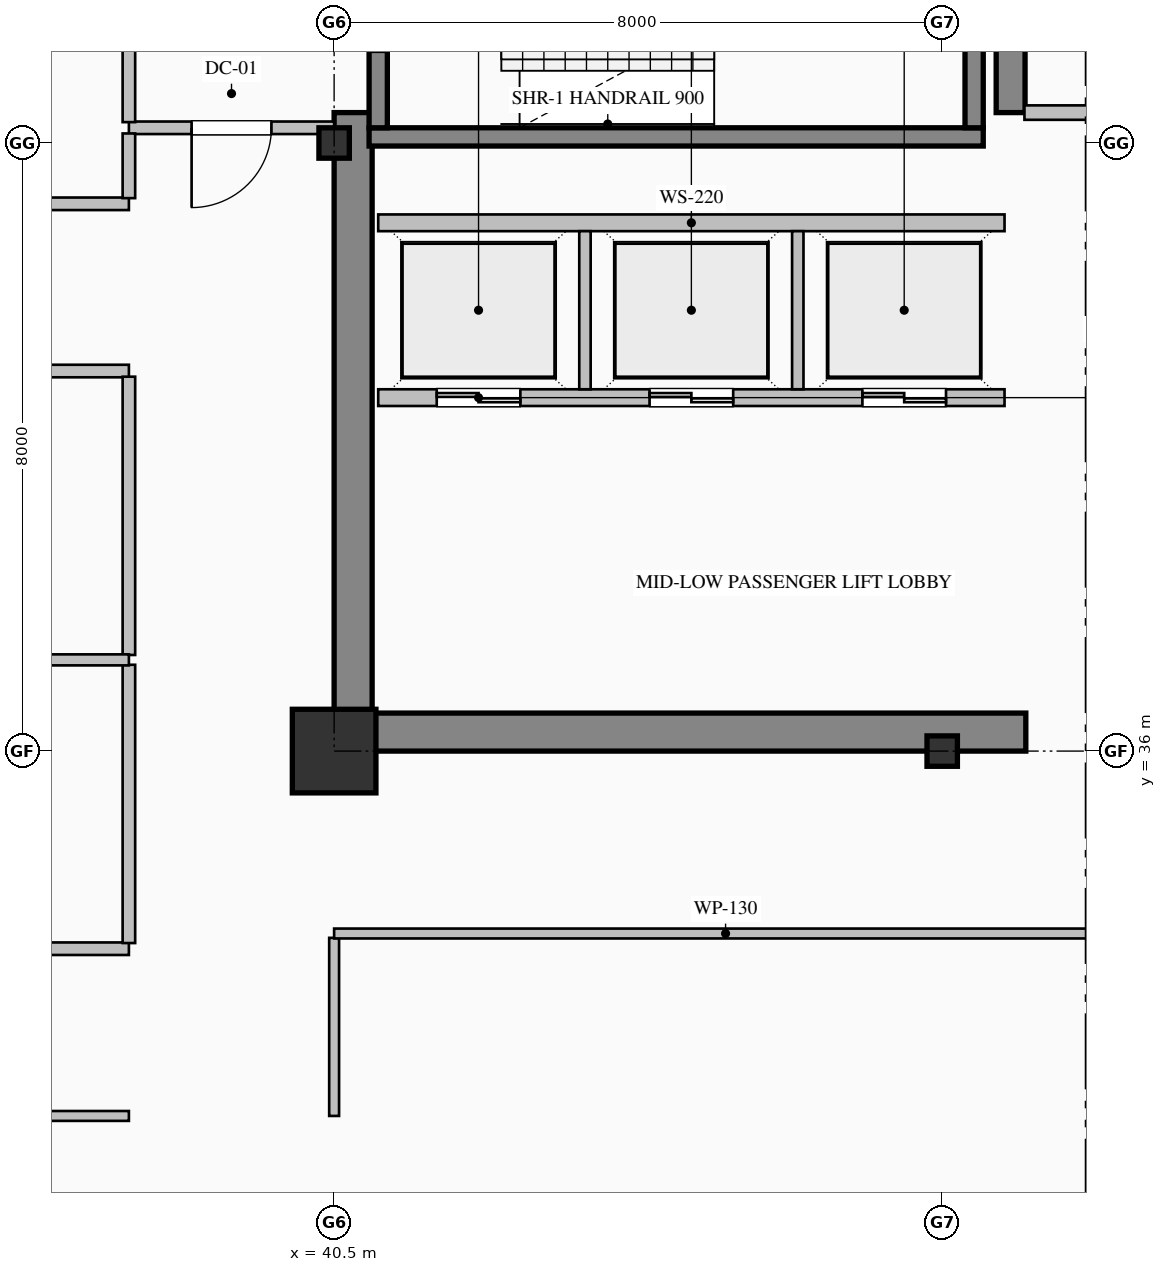
"""IFC4 building model, lengths in metres.
Left out: names, types, materials, properties, quantities, classifications, styles, units other than length and angle.
Written with IfcOpenShell. Run it as: python <this file> out.ifc"""

import sys

from ifc_helpers import new_model, si_unit, direction, frame, frame_2d, origin, origin_2d, place, context, subcontext, project, spatial, rectangle, hollow_rectangle, i_section, extrude, element, fill, save


model = new_model("IFC4")
c1 = context("Model", 3, precision=1e-05, world=origin(), true_north=direction((0.0, 1.0)))
c2 = subcontext(c1, "Body", "Model", "MODEL_VIEW")
j1 = project(units=[si_unit("LENGTHUNIT", "METRE"), si_unit("PLANEANGLEUNIT", "RADIAN")], contexts=[c1])
p1 = place(None, origin())
s1 = spatial("IfcSite", under=j1, at=p1, CompositionType="ELEMENT")
p2 = place(p1, origin())
s2 = spatial("IfcBuilding", under=s1, at=p2, CompositionType="ELEMENT")
p3 = place(p2, frame((0.0, 0.0, 191.0)))
s3 = spatial("IfcBuildingStorey", under=s2, at=p3, CompositionType="ELEMENT", Elevation=191.0)
p4 = place(p3, frame((40.75, 36.5, 0.0), z_axis=(0.0, 0.0, 1.0), x_axis=(0.0, 1.0, 0.0)))
e1 = element("IfcWall", 1, at=p4, inside=s3, PredefinedType="SHEAR", context=c2, shape_type="SweptSolid", body=[
    extrude(rectangle(XDim=7.9, YDim=0.5, at=frame_2d((3.95, 0.0))), origin(), (0.0, 0.0, 1.0), 3.65),
])
p5 = place(p3, frame((40.5, 36.25, 0.0), z_axis=(0.0, 0.0, 1.0), x_axis=(1.0, 0.0, 0.0)))
e2 = element("IfcWall", 2, at=p5, inside=s3, PredefinedType="SHEAR", context=c2, shape_type="SweptSolid", body=[
    extrude(rectangle(XDim=9.1, YDim=0.5, at=frame_2d((4.55, 0.0))), origin(), (0.0, 0.0, 1.0), 3.65),
])
p6 = place(p3, frame((49.4, 44.4, 0.0), z_axis=(0.0, 0.0, 1.0), x_axis=(0.0, 1.0, 0.0)))
e3 = element("IfcWall", 3, at=p6, inside=s3, PredefinedType="SHEAR", context=c2, shape_type="SweptSolid", body=[
    extrude(rectangle(XDim=3.0, YDim=0.38, at=frame_2d((1.5, 0.0))), origin(), (0.0, 0.0, 1.0), 3.65),
])
p7 = place(p3, frame((40.5, 36.0, 0.0), z_axis=(0.0, 0.0, 1.0), x_axis=(1.0, 0.0, 0.0)))
e4 = element("IfcColumn", 4, at=p7, inside=s3, PredefinedType="COLUMN", context=c2, shape_type="SweptSolid", body=[
    extrude(hollow_rectangle(XDim=1.1, YDim=1.1, WallThickness=0.04, at=origin_2d()), origin(), (0.0, 0.0, 1.0), 4.0),
])
for number, where, z_axis, x_axis in (
    (5, (40.5, 44.0, 0.0), (0.0, 0.0, 1.0), (1.0, 0.0, 0.0)),
    (6, (48.5, 36.0, 0.0), (0.0, 0.0, 1.0), (1.0, 0.0, 0.0)),
):
    element("IfcColumn", number, at=place(p3, frame(where, z_axis=z_axis, x_axis=x_axis)), inside=s3, PredefinedType="COLUMN", context=c2, shape_type="SweptSolid", body=[
        extrude(i_section(OverallWidth=0.4, OverallDepth=0.4, WebThickness=0.013, FlangeThickness=0.021, FilletRadius=0.022, at=origin_2d()), origin(), (0.0, 0.0, 1.0), 4.0),
    ])
p8 = place(p3, frame((49.04, 44.08, 0.0), z_axis=(0.0, 0.0, 1.0), x_axis=(-1.0, 0.0, 0.0)))
e7 = element("IfcWall", 7, at=p8, inside=s3, PredefinedType="SOLIDWALL", context=c2, shape_type="SweptSolid", body=[
    extrude(rectangle(XDim=8.08, YDim=0.24, at=frame_2d((4.04, 0.0))), origin(), (0.0, 0.0, 1.0), 4.0),
])
p9 = place(p3, frame((41.08, 47.35, 0.0), z_axis=(0.0, 0.0, 1.0), x_axis=(0.0, -1.0, 0.0)))
e8 = element("IfcWall", 8, at=p9, inside=s3, PredefinedType="SOLIDWALL", context=c2, shape_type="SweptSolid", body=[
    extrude(rectangle(XDim=3.15, YDim=0.24, at=frame_2d((1.575, 0.0))), origin(), (0.0, 0.0, 1.0), 4.0),
])
p10 = place(p9, frame((1.0, 0.0, 0.0)))
e9 = element("IfcOpeningElement", 9, at=p10, cuts=e8, PredefinedType="OPENING", context=c2, shape_type="SweptSolid", body=[
    extrude(rectangle(XDim=1.15, YDim=2.2, at=frame_2d((0.575, 1.1))), frame((0.0, 0.13, 0.0), z_axis=(0.0, -1.0, 0.0), x_axis=(1.0, 0.0, 0.0)), (0.0, 0.0, 1.0), 0.26),
])
p11 = place(p3, frame((48.92, 44.2, 0.0), z_axis=(0.0, 0.0, 1.0), x_axis=(0.0, 1.0, 0.0)))
e10 = element("IfcWall", 10, at=p11, inside=s3, PredefinedType="SOLIDWALL", context=c2, shape_type="SweptSolid", body=[
    extrude(rectangle(XDim=3.15, YDim=0.24, at=frame_2d((1.575, 0.0))), origin(), (0.0, 0.0, 1.0), 4.0),
])
p12 = place(p3, frame((49.32, 40.65, 0.0), z_axis=(0.0, 0.0, 1.0), x_axis=(-1.0, 0.0, 0.0)))
e11 = element("IfcWall", 11, at=p12, inside=s3, PredefinedType="PARTITIONING", context=c2, shape_type="SweptSolid", body=[
    extrude(rectangle(XDim=8.24, YDim=0.22, at=frame_2d((4.12, 0.0))), origin(), (0.0, 0.0, 1.0), 3.65),
])
p13 = place(p12, frame((6.37, 0.0, 0.0)))
e12 = element("IfcOpeningElement", 12, at=p13, cuts=e11, PredefinedType="OPENING", context=c2, shape_type="SweptSolid", body=[
    extrude(rectangle(XDim=1.1, YDim=2.2, at=frame_2d((0.55, 1.1))), frame((0.0, 0.12, 0.0), z_axis=(0.0, -1.0, 0.0), x_axis=(1.0, 0.0, 0.0)), (0.0, 0.0, 1.0), 0.24),
])
p14 = place(p12, frame((3.57, 0.0, 0.0)))
e13 = element("IfcOpeningElement", 13, at=p14, cuts=e11, PredefinedType="OPENING", context=c2, shape_type="SweptSolid", body=[
    extrude(rectangle(XDim=1.1, YDim=2.2, at=frame_2d((0.55, 1.1))), frame((0.0, 0.12, 0.0), z_axis=(0.0, -1.0, 0.0), x_axis=(1.0, 0.0, 0.0)), (0.0, 0.0, 1.0), 0.24),
])
p15 = place(p12, frame((0.77, 0.0, 0.0)))
e14 = element("IfcOpeningElement", 14, at=p15, cuts=e11, PredefinedType="OPENING", context=c2, shape_type="SweptSolid", body=[
    extrude(rectangle(XDim=1.1, YDim=2.2, at=frame_2d((0.55, 1.1))), frame((0.0, 0.12, 0.0), z_axis=(0.0, -1.0, 0.0), x_axis=(1.0, 0.0, 0.0)), (0.0, 0.0, 1.0), 0.24),
])
p16 = place(p3, frame((41.08, 42.95, 0.0), z_axis=(0.0, 0.0, 1.0), x_axis=(1.0, 0.0, 0.0)))
e15 = element("IfcWall", 15, at=p16, inside=s3, PredefinedType="PARTITIONING", context=c2, shape_type="SweptSolid", body=[
    extrude(rectangle(XDim=8.24, YDim=0.22, at=frame_2d((4.12, 0.0))), origin(), (0.0, 0.0, 1.0), 3.65),
])
for number, where, z_axis, x_axis in (
    (16, (43.8, 40.76, 0.0), (0.0, 0.0, 1.0), (0.0, 1.0, 0.0)),
    (17, (46.6, 40.76, 0.0), (0.0, 0.0, 1.0), (0.0, 1.0, 0.0)),
):
    element("IfcWall", number, at=place(p3, frame(where, z_axis=z_axis, x_axis=x_axis)), inside=s3, PredefinedType="PARTITIONING", context=c2, shape_type="SweptSolid", body=[
        extrude(rectangle(XDim=2.08, YDim=0.15, at=frame_2d((1.04, 0.0))), origin(), (0.0, 0.0, 1.0), 3.65),
    ])
p17 = place(p3, frame((40.5, 44.2, 0.0), z_axis=(0.0, 0.0, 1.0), x_axis=(-1.0, 0.0, 0.0)))
e18 = element("IfcWall", 18, at=p17, inside=s3, PredefinedType="PARTITIONING", context=c2, shape_type="SweptSolid", body=[
    extrude(rectangle(XDim=2.7, YDim=0.165, at=frame_2d((1.35, 0.0))), origin(), (0.0, 0.0, 1.0), 3.65),
])
p18 = place(p17, frame((0.825, 0.0, 0.0)))
e19 = element("IfcOpeningElement", 19, at=p18, cuts=e18, PredefinedType="OPENING", context=c2, shape_type="SweptSolid", body=[
    extrude(rectangle(XDim=1.05, YDim=2.15, at=frame_2d((0.525, 1.075))), frame((0.0, 0.093, 0.0), z_axis=(0.0, -1.0, 0.0), x_axis=(1.0, 0.0, 0.0)), (0.0, 0.0, 1.0), 0.185),
])
p19 = place(p3, frame((37.8, 44.274, 0.0), z_axis=(0.0, 0.0, 1.0), x_axis=(0.0, 1.0, 0.0)))
e20 = element("IfcWall", 20, at=p19, inside=s3, PredefinedType="PARTITIONING", context=c2, shape_type="SweptSolid", body=[
    extrude(rectangle(XDim=3.051, YDim=0.165, at=frame_2d((1.525, 0.0))), origin(), (0.0, 0.0, 1.0), 3.65),
])
p20 = place(p3, frame((54.718, 44.4, 0.0), z_axis=(0.0, 0.0, 1.0), x_axis=(-1.0, 0.0, 0.0)))
e21 = element("IfcWall", 21, at=p20, inside=s3, PredefinedType="PARTITIONING", context=c2, shape_type="SweptSolid", body=[
    extrude(rectangle(XDim=5.136, YDim=0.19, at=frame_2d((2.568, 0.0))), origin(), (0.0, 0.0, 1.0), 3.65),
])
p21 = place(p20, frame((2.043, 0.0, 0.0)))
e22 = element("IfcOpeningElement", 22, at=p21, cuts=e21, PredefinedType="OPENING", context=c2, shape_type="SweptSolid", body=[
    extrude(rectangle(XDim=1.05, YDim=2.15, at=frame_2d((0.525, 1.075))), frame((0.0, 0.105, 0.0), z_axis=(0.0, -1.0, 0.0), x_axis=(1.0, 0.0, 0.0)), (0.0, 0.0, 1.0), 0.21),
])
p22 = place(p3, frame((18.7, 33.4, 0.0), z_axis=(0.0, 0.0, 1.0), x_axis=(1.0, 0.0, 0.0)))
e23 = element("IfcWall", 23, at=p22, inside=s3, PredefinedType="PARTITIONING", context=c2, shape_type="SweptSolid", body=[
    extrude(rectangle(XDim=19.1, YDim=0.165, at=frame_2d((9.55, 0.0))), origin(), (0.0, 0.0, 1.0), 3.65),
])
p23 = place(p22, frame((9.1, 0.0, 0.0)))
e24 = element("IfcOpeningElement", 24, at=p23, cuts=e23, PredefinedType="OPENING", context=c2, shape_type="SweptSolid", body=[
    extrude(rectangle(XDim=0.9, YDim=2.15, at=frame_2d((0.45, 1.075))), frame((0.0, 0.093, 0.0), z_axis=(0.0, -1.0, 0.0), x_axis=(1.0, 0.0, 0.0)), (0.0, 0.0, 1.0), 0.185),
])
p24 = place(p3, frame((37.8, 31.2, 0.0), z_axis=(0.0, 0.0, 1.0), x_axis=(-1.0, 0.0, 0.0)))
e25 = element("IfcWall", 25, at=p24, inside=s3, PredefinedType="PARTITIONING", context=c2, shape_type="SweptSolid", body=[
    extrude(rectangle(XDim=10.8, YDim=0.13, at=frame_2d((5.4, 0.0))), origin(), (0.0, 0.0, 1.0), 3.65),
])
p25 = place(p24, frame((4.9, 0.0, 0.0)))
e26 = element("IfcOpeningElement", 26, at=p25, cuts=e25, PredefinedType="OPENING", context=c2, shape_type="SweptSolid", body=[
    extrude(rectangle(XDim=1.0, YDim=2.15, at=frame_2d((0.5, 1.075))), frame((0.0, 0.075, 0.0), z_axis=(0.0, -1.0, 0.0), x_axis=(1.0, 0.0, 0.0)), (0.0, 0.0, 1.0), 0.15),
])
p26 = place(p3, frame((30.6, 43.2, 0.0), z_axis=(0.0, 0.0, 1.0), x_axis=(1.0, 0.0, 0.0)))
e27 = element("IfcWall", 27, at=p26, inside=s3, PredefinedType="PARTITIONING", context=c2, shape_type="SweptSolid", body=[
    extrude(rectangle(XDim=7.2, YDim=0.165, at=frame_2d((3.6, 0.0))), origin(), (0.0, 0.0, 1.0), 3.65),
])
p27 = place(p26, frame((3.05, 0.0, 0.0)))
e28 = element("IfcOpeningElement", 28, at=p27, cuts=e27, PredefinedType="OPENING", context=c2, shape_type="SweptSolid", body=[
    extrude(rectangle(XDim=1.1, YDim=2.2, at=frame_2d((0.55, 1.1))), frame((0.0, 0.093, 0.0), z_axis=(0.0, -1.0, 0.0), x_axis=(1.0, 0.0, 0.0)), (0.0, 0.0, 1.0), 0.185),
])
p28 = place(p3, frame((37.8, 41.0, 0.0), z_axis=(0.0, 0.0, 1.0), x_axis=(-1.0, 0.0, 0.0)))
e29 = element("IfcWall", 29, at=p28, inside=s3, PredefinedType="PARTITIONING", context=c2, shape_type="SweptSolid", body=[
    extrude(rectangle(XDim=19.1, YDim=0.165, at=frame_2d((9.55, 0.0))), origin(), (0.0, 0.0, 1.0), 3.65),
])
p29 = place(p28, frame((9.05, 0.0, 0.0)))
e30 = element("IfcOpeningElement", 30, at=p29, cuts=e29, PredefinedType="OPENING", context=c2, shape_type="SweptSolid", body=[
    extrude(rectangle(XDim=1.0, YDim=2.15, at=frame_2d((0.5, 1.075))), frame((0.0, 0.093, 0.0), z_axis=(0.0, -1.0, 0.0), x_axis=(1.0, 0.0, 0.0)), (0.0, 0.0, 1.0), 0.185),
])
p30 = place(p3, frame((37.8, 43.274, 0.0), z_axis=(0.0, 0.0, 1.0), x_axis=(0.0, 1.0, 0.0)))
e31 = element("IfcWall", 31, at=p30, inside=s3, PredefinedType="PARTITIONING", context=c2, shape_type="SweptSolid", body=[
    extrude(rectangle(XDim=0.851, YDim=0.165, at=frame_2d((0.426, 0.0))), origin(), (0.0, 0.0, 1.0), 3.65),
])
p31 = place(p3, frame((37.8, 33.475, 0.0), z_axis=(0.0, 0.0, 1.0), x_axis=(0.0, 1.0, 0.0)))
e32 = element("IfcWall", 32, at=p31, inside=s3, PredefinedType="PARTITIONING", context=c2, shape_type="SweptSolid", body=[
    extrude(rectangle(XDim=3.661, YDim=0.165, at=frame_2d((1.831, 0.0))), origin(), (0.0, 0.0, 1.0), 3.65),
])
p32 = place(p3, frame((37.8, 37.264, 0.0), z_axis=(0.0, 0.0, 1.0), x_axis=(0.0, 1.0, 0.0)))
e33 = element("IfcWall", 33, at=p32, inside=s3, PredefinedType="PARTITIONING", context=c2, shape_type="SweptSolid", body=[
    extrude(rectangle(XDim=3.661, YDim=0.165, at=frame_2d((1.831, 0.0))), origin(), (0.0, 0.0, 1.0), 3.65),
])
p33 = place(p3, frame((40.5, 33.543, 0.0), z_axis=(0.0, 0.0, 1.0), x_axis=(0.0, -1.0, 0.0)))
e34 = element("IfcWall", 34, at=p33, inside=s3, PredefinedType="PARTITIONING", context=c2, shape_type="SweptSolid", body=[
    extrude(rectangle(XDim=2.343, YDim=0.13, at=frame_2d((1.171, 0.0))), origin(), (0.0, 0.0, 1.0), 3.042),
])
p34 = place(p3, frame((50.8, 33.6, 0.0), z_axis=(0.0, 0.0, 1.0), x_axis=(-1.0, 0.0, 0.0)))
e35 = element("IfcWall", 35, at=p34, inside=s3, PredefinedType="PARTITIONING", context=c2, shape_type="SweptSolid", body=[
    extrude(rectangle(XDim=10.3, YDim=0.13, at=frame_2d((5.15, 0.0))), origin(), (0.0, 0.0, 1.0), 3.65),
])
p35 = place(p3, frame((18.7, 37.2, 0.0), z_axis=(0.0, 0.0, 1.0), x_axis=(1.0, 0.0, 0.0)))
e36 = element("IfcWall", 36, at=p35, inside=s3, PredefinedType="PARTITIONING", context=c2, shape_type="SweptSolid", body=[
    extrude(rectangle(XDim=19.1, YDim=0.145, at=frame_2d((9.55, 0.0))), origin(), (0.0, 0.0, 1.0), 3.65),
])
p36 = place(p13, origin())
e37 = element("IfcDoor", 37, at=p36, inside=s3, OperationType="DOUBLE_DOOR_SLIDING", PredefinedType="DOOR", context=c2, shape_type="SweptSolid", body=[
    extrude(rectangle(XDim=1.1, YDim=2.2, at=frame_2d((0.55, 1.1))), frame((0.0, 0.025, 0.0), z_axis=(0.0, -1.0, 0.0), x_axis=(1.0, 0.0, 0.0)), (0.0, 0.0, 1.0), 0.05),
])
fill(e12, e37)
p37 = place(p14, origin())
e38 = element("IfcDoor", 38, at=p37, inside=s3, OperationType="DOUBLE_DOOR_SLIDING", PredefinedType="DOOR", context=c2, shape_type="SweptSolid", body=[
    extrude(rectangle(XDim=1.1, YDim=2.2, at=frame_2d((0.55, 1.1))), frame((0.0, 0.025, 0.0), z_axis=(0.0, -1.0, 0.0), x_axis=(1.0, 0.0, 0.0)), (0.0, 0.0, 1.0), 0.05),
])
fill(e13, e38)
p38 = place(p15, origin())
e39 = element("IfcDoor", 39, at=p38, inside=s3, OperationType="DOUBLE_DOOR_SLIDING", PredefinedType="DOOR", context=c2, shape_type="SweptSolid", body=[
    extrude(rectangle(XDim=1.1, YDim=2.2, at=frame_2d((0.55, 1.1))), frame((0.0, 0.025, 0.0), z_axis=(0.0, -1.0, 0.0), x_axis=(1.0, 0.0, 0.0)), (0.0, 0.0, 1.0), 0.05),
])
fill(e14, e39)
p39 = place(p18, origin())
e40 = element("IfcDoor", 40, at=p39, inside=s3, OperationType="SINGLE_SWING_RIGHT", PredefinedType="DOOR", context=c2, shape_type="SweptSolid", body=[
    extrude(rectangle(XDim=1.05, YDim=2.15, at=frame_2d((0.525, 1.075))), frame((0.0, 0.025, 0.0), z_axis=(0.0, -1.0, 0.0), x_axis=(1.0, 0.0, 0.0)), (0.0, 0.0, 1.0), 0.05),
])
fill(e19, e40)
save(model, sys.argv[1])
